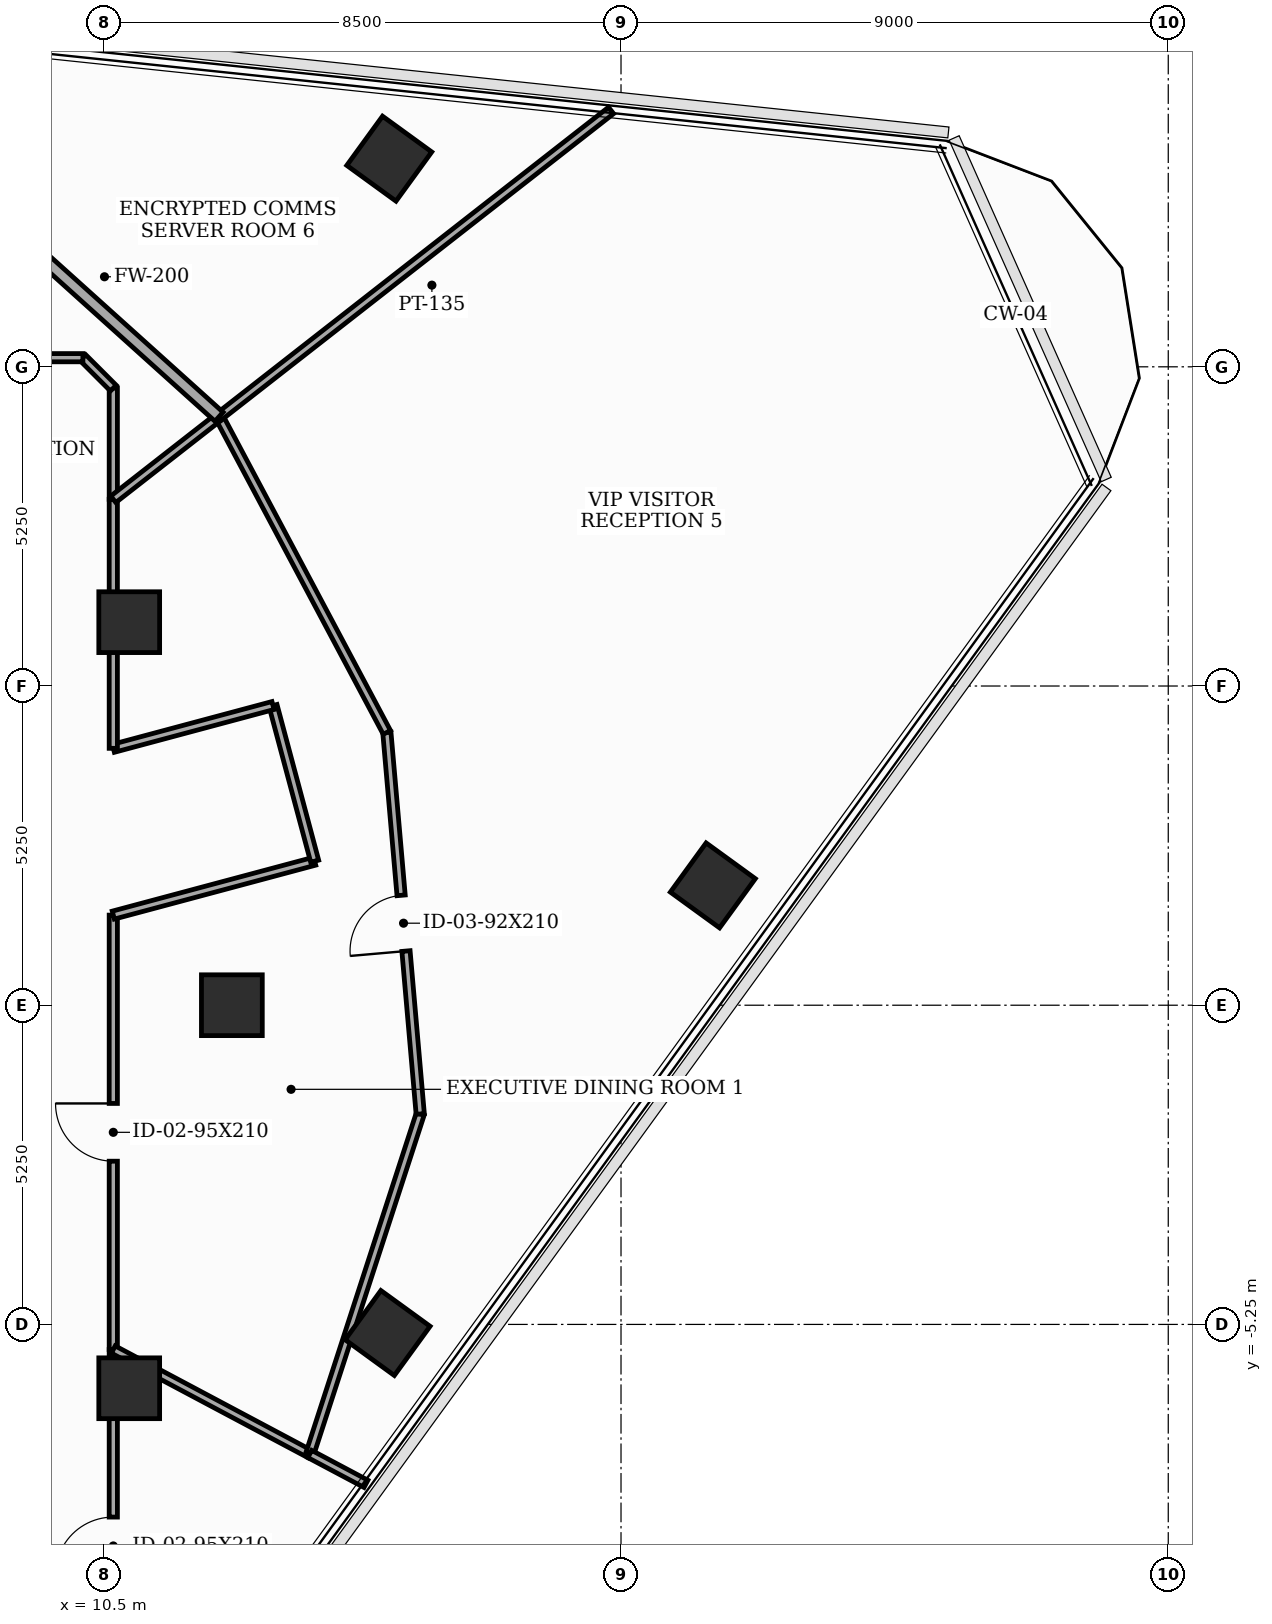
"""IFC4 building model, lengths in metres.
Left out: names, types, materials, properties, quantities, classifications, styles, units other than length and angle.
Written with IfcOpenShell. Run it as: python <this file> out.ifc"""

import sys

from ifc_helpers import new_model, si_unit, direction, frame, frame_2d, origin, origin_2d, place, context, subcontext, project, spatial, rectangle, extrude, element, fill, save


model = new_model("IFC4")
c1 = context("Model", 3, precision=1e-05, world=origin(), true_north=direction((0.0, 1.0)))
c2 = subcontext(c1, "Body", "Model", "MODEL_VIEW")
j1 = project(units=[si_unit("LENGTHUNIT", "METRE"), si_unit("PLANEANGLEUNIT", "RADIAN")], contexts=[c1])
p1 = place(None, origin())
s1 = spatial("IfcSite", under=j1, at=p1, CompositionType="ELEMENT")
p2 = place(p1, origin())
s2 = spatial("IfcBuilding", under=s1, at=p2, CompositionType="ELEMENT")
p3 = place(p2, frame((0.0, 0.0, 226.3)))
s3 = spatial("IfcBuildingStorey", under=s2, at=p3, CompositionType="ELEMENT", Elevation=226.3)
for number, where, z_axis, x_axis in (
    (1, (12.6, 0.0, 0.0), (0.0, 0.0, 1.0), (1.0, 0.0, 0.0)),
    (2, (10.912, 6.3, 0.0), (0.0, 0.0, 1.0), (1.0, 0.0, 0.0)),
    (3, (10.912, -6.3, 0.0), (0.0, 0.0, 1.0), (1.0, 0.0, 0.0)),
    (4, (15.161, -5.391, 0.0), (0.0, 0.0, 1.0), (0.588, 0.809, 0.0)),
    (5, (20.51, 1.971, 0.0), (0.0, 0.0, 1.0), (0.588, 0.809, 0.0)),
    (6, (15.188, 13.923, 0.0), (0.0, 0.0, 1.0), (0.588, 0.809, 0.0)),
):
    element("IfcColumn", number, at=place(p3, frame(where, z_axis=z_axis, x_axis=x_axis)), inside=s3, PredefinedType="COLUMN", context=c2, shape_type="SweptSolid", body=[
        extrude(rectangle(XDim=1.0, YDim=1.0, at=origin_2d()), origin(), (0.0, 0.0, 1.0), 3.7),
    ])
p4 = place(p3, frame((10.65, -5.663, 0.0), z_axis=(0.0, 0.0, 1.0), x_axis=(0.0, 1.0, 0.0)))
e7 = element("IfcWall", 7, at=p4, inside=s3, PredefinedType="PARTITIONING", context=c2, shape_type="SweptSolid", body=[
    extrude(rectangle(XDim=7.145, YDim=0.135, at=frame_2d((3.573, 0.0))), origin(), (0.0, 0.0, 1.0), 2.885),
])
p5 = place(p4, frame((3.097, 0.0, 0.0)))
e8 = element("IfcOpeningElement", 8, at=p5, cuts=e7, PredefinedType="OPENING", context=c2, shape_type="SweptSolid", body=[
    extrude(rectangle(XDim=0.95, YDim=2.1, at=frame_2d((0.475, 1.05))), frame((0.0, 0.077, 0.0), z_axis=(0.0, -1.0, 0.0), x_axis=(1.0, 0.0, 0.0)), (0.0, 0.0, 1.0), 0.155),
])
p6 = place(p3, frame((10.65, 1.482, 0.0), z_axis=(0.0, 0.0, 1.0), x_axis=(0.965961397105, 0.2586862565, 0.0)))
e9 = element("IfcWall", 9, at=p6, inside=s3, PredefinedType="PARTITIONING", context=c2, shape_type="SweptSolid", body=[
    extrude(rectangle(XDim=3.429, YDim=0.135, at=frame_2d((1.714, 0.0))), origin(), (0.0, 0.0, 1.0), 2.885),
])
p7 = place(p3, frame((13.962, 2.369, 0.0), z_axis=(0.0, 0.0, 1.0), x_axis=(-0.258413725385, 0.966034340245, 0.0)))
e10 = element("IfcWall", 10, at=p7, inside=s3, PredefinedType="PARTITIONING", context=c2, shape_type="SweptSolid", body=[
    extrude(rectangle(XDim=2.65, YDim=0.135, at=frame_2d((1.325, 0.0))), origin(), (0.0, 0.0, 1.0), 3.5),
])
p8 = place(p3, frame((13.277, 4.929, 0.0), z_axis=(0.0, 0.0, 1.0), x_axis=(-0.965934830229, -0.258785439601, 0.0)))
e11 = element("IfcWall", 11, at=p8, inside=s3, PredefinedType="PARTITIONING", context=c2, shape_type="SweptSolid", body=[
    extrude(rectangle(XDim=2.72, YDim=0.135, at=frame_2d((1.36, 0.0))), origin(), (0.0, 0.0, 1.0), 2.885),
])
p9 = place(p3, frame((10.65, 4.225, 0.0), z_axis=(0.0, 0.0, 1.0), x_axis=(0.0, 1.0, 0.0)))
e12 = element("IfcWall", 12, at=p9, inside=s3, PredefinedType="PARTITIONING", context=c2, shape_type="SweptSolid", body=[
    extrude(rectangle(XDim=4.096, YDim=0.135, at=frame_2d((2.048, 0.0))), origin(), (0.0, 0.0, 1.0), 2.885),
])
p10 = place(p3, frame((10.65, -10.15, 0.0), z_axis=(0.0, 0.0, 1.0), x_axis=(0.0, 1.0, 0.0)))
e13 = element("IfcWall", 13, at=p10, inside=s3, PredefinedType="PARTITIONING", context=c2, shape_type="SweptSolid", body=[
    extrude(rectangle(XDim=4.487, YDim=0.135, at=frame_2d((2.243, 0.0))), origin(), (0.0, 0.0, 1.0), 2.885),
])
p11 = place(p10, frame((0.781, 0.0, 0.0)))
e14 = element("IfcOpeningElement", 14, at=p11, cuts=e13, PredefinedType="OPENING", context=c2, shape_type="SweptSolid", body=[
    extrude(rectangle(XDim=0.95, YDim=2.1, at=frame_2d((0.475, 1.05))), frame((0.0, 0.077, 0.0), z_axis=(0.0, -1.0, 0.0), x_axis=(1.0, 0.0, 0.0)), (0.0, 0.0, 1.0), 0.155),
])
p12 = place(p3, frame((10.65, 8.321, 0.0), z_axis=(0.0, 0.0, 1.0), x_axis=(0.0, 1.0, 0.0)))
e15 = element("IfcWall", 15, at=p12, inside=s3, PredefinedType="PARTITIONING", context=c2, shape_type="SweptSolid", body=[
    extrude(rectangle(XDim=1.829, YDim=0.135, at=frame_2d((0.915, 0.0))), origin(), (0.0, 0.0, 1.0), 3.5),
])
p13 = place(p3, frame((10.65, 10.15, 0.0), z_axis=(0.0, 0.0, 1.0), x_axis=(-0.707106781187, 0.707106781187, 0.0)))
e16 = element("IfcWall", 16, at=p13, inside=s3, PredefinedType="PARTITIONING", context=c2, shape_type="SweptSolid", body=[
    extrude(rectangle(XDim=0.707, YDim=0.135, at=frame_2d((0.354, 0.0))), origin(), (0.0, 0.0, 1.0), 3.5),
])
p14 = place(p3, frame((10.15, 10.65, 0.0), z_axis=(0.0, 0.0, 1.0), x_axis=(-1.0, 0.0, 0.0)))
e17 = element("IfcWall", 17, at=p14, inside=s3, PredefinedType="PARTITIONING", context=c2, shape_type="SweptSolid", body=[
    extrude(rectangle(XDim=11.3, YDim=0.135, at=frame_2d((5.65, 0.0))), origin(), (0.0, 0.0, 1.0), 2.885),
])
p15 = place(p14, frame((6.531, 0.0, 0.0)))
e18 = element("IfcOpeningElement", 18, at=p15, cuts=e17, PredefinedType="OPENING", context=c2, shape_type="SweptSolid", body=[
    extrude(rectangle(XDim=0.95, YDim=2.1, at=frame_2d((0.475, 1.05))), frame((0.0, 0.077, 0.0), z_axis=(0.0, -1.0, 0.0), x_axis=(1.0, 0.0, 0.0)), (0.0, 0.0, 1.0), 0.155),
])
p16 = place(p3, frame((10.65, -5.663, 0.0), z_axis=(0.0, 0.0, 1.0), x_axis=(0.882952413676, -0.469462496036, 0.0)))
e19 = element("IfcWall", 19, at=p16, inside=s3, PredefinedType="PARTITIONING", context=c2, shape_type="SweptSolid", body=[
    extrude(rectangle(XDim=3.659, YDim=0.135, at=frame_2d((1.83, 0.0))), origin(), (0.0, 0.0, 1.0), 2.885),
])
p17 = place(p3, frame((13.881, -7.381, 0.0), z_axis=(0.0, 0.0, 1.0), x_axis=(0.309006266506, 0.951060001924, 0.0)))
e20 = element("IfcWall", 20, at=p17, inside=s3, PredefinedType="PARTITIONING", context=c2, shape_type="SweptSolid", body=[
    extrude(rectangle(XDim=5.88, YDim=0.135, at=frame_2d((2.94, 0.0))), origin(), (0.0, 0.0, 1.0), 2.985),
])
p18 = place(p3, frame((15.698, -1.789, 0.0), z_axis=(0.0, 0.0, 1.0), x_axis=(-0.087153009445, 0.996194937221, 0.0)))
e21 = element("IfcWall", 21, at=p18, inside=s3, PredefinedType="PARTITIONING", context=c2, shape_type="SweptSolid", body=[
    extrude(rectangle(XDim=6.3, YDim=0.135, at=frame_2d((3.15, 0.0))), origin(), (0.0, 0.0, 1.0), 2.985),
])
p19 = place(p18, frame((2.69, 0.0, 0.0)))
e22 = element("IfcOpeningElement", 22, at=p19, cuts=e21, PredefinedType="OPENING", context=c2, shape_type="SweptSolid", body=[
    extrude(rectangle(XDim=0.92, YDim=2.1, at=frame_2d((0.46, 1.05))), frame((0.0, 0.077, 0.0), z_axis=(0.0, -1.0, 0.0), x_axis=(1.0, 0.0, 0.0)), (0.0, 0.0, 1.0), 0.155),
])
p20 = place(p3, frame((15.149, 4.487, 0.0), z_axis=(0.0, 0.0, 1.0), x_axis=(-0.469396049876, 0.882987739643, 0.0)))
e23 = element("IfcWall", 23, at=p20, inside=s3, PredefinedType="PARTITIONING", context=c2, shape_type="SweptSolid", body=[
    extrude(rectangle(XDim=5.88, YDim=0.135, at=frame_2d((2.94, 0.0))), origin(), (0.0, 0.0, 1.0), 2.985),
])
p21 = place(p3, frame((12.389, 9.679, 0.0), z_axis=(0.0, 0.0, 1.0), x_axis=(-0.788177008199, -0.615448619908, 0.0)))
e24 = element("IfcWall", 24, at=p21, inside=s3, PredefinedType="PARTITIONING", context=c2, shape_type="SweptSolid", body=[
    extrude(rectangle(XDim=2.206, YDim=0.135, at=frame_2d((1.103, 0.0))), origin(), (0.0, 0.0, 1.0), 3.5),
])
p22 = place(p3, frame((14.805, -7.872, 0.0), z_axis=(0.0, 0.0, 1.0), x_axis=(-0.883242549552, 0.468916409033, 0.0)))
e25 = element("IfcWall", 25, at=p22, inside=s3, PredefinedType="PARTITIONING", context=c2, shape_type="SweptSolid", body=[
    extrude(rectangle(XDim=1.046, YDim=0.135, at=frame_2d((0.523, 0.0))), origin(), (0.0, 0.0, 1.0), 3.035),
])
p23 = place(p3, frame((18.836, 14.716, 0.0), z_axis=(0.0, 0.0, 1.0), x_axis=(-0.78799903942, -0.615676468507, 0.0)))
e26 = element("IfcWall", 26, at=p23, inside=s3, PredefinedType="PARTITIONING", context=c2, shape_type="SweptSolid", body=[
    extrude(rectangle(XDim=8.182, YDim=0.135, at=frame_2d((4.091, 0.0))), origin(), (0.0, 0.0, 1.0), 2.985),
])
p24 = place(p3, frame((8.019, 13.614, 0.0), z_axis=(0.0, 0.0, 1.0), x_axis=(0.743110388877, -0.669168850099, 0.0)))
e27 = element("IfcWall", 27, at=p24, inside=s3, PredefinedType="SOLIDWALL", context=c2, shape_type="SweptSolid", body=[
    extrude(rectangle(XDim=5.881, YDim=0.2, at=frame_2d((2.94, 0.0))), origin(), (0.0, 0.0, 1.0), 3.5),
])
p25 = place(p5, origin())
e28 = element("IfcDoor", 28, at=p25, inside=s3, OperationType="SINGLE_SWING_RIGHT", PredefinedType="DOOR", context=c2, shape_type="SweptSolid", body=[
    extrude(rectangle(XDim=0.95, YDim=2.1, at=frame_2d((0.475, 1.05))), frame((0.0, 0.025, 0.0), z_axis=(0.0, -1.0, 0.0), x_axis=(1.0, 0.0, 0.0)), (0.0, 0.0, 1.0), 0.05),
])
fill(e8, e28)
p26 = place(p11, origin())
e29 = element("IfcDoor", 29, at=p26, inside=s3, OperationType="SINGLE_SWING_LEFT", PredefinedType="DOOR", context=c2, shape_type="SweptSolid", body=[
    extrude(rectangle(XDim=0.95, YDim=2.1, at=frame_2d((0.475, 1.05))), frame((0.0, 0.025, 0.0), z_axis=(0.0, -1.0, 0.0), x_axis=(1.0, 0.0, 0.0)), (0.0, 0.0, 1.0), 0.05),
])
fill(e14, e29)
p27 = place(p19, origin())
e30 = element("IfcDoor", 30, at=p27, inside=s3, OperationType="SINGLE_SWING_LEFT", PredefinedType="DOOR", context=c2, shape_type="SweptSolid", body=[
    extrude(rectangle(XDim=0.92, YDim=2.1, at=frame_2d((0.46, 1.05))), frame((0.0, 0.025, 0.0), z_axis=(0.0, -1.0, 0.0), x_axis=(1.0, 0.0, 0.0)), (0.0, 0.0, 1.0), 0.05),
])
fill(e22, e30)
save(model, sys.argv[1])
